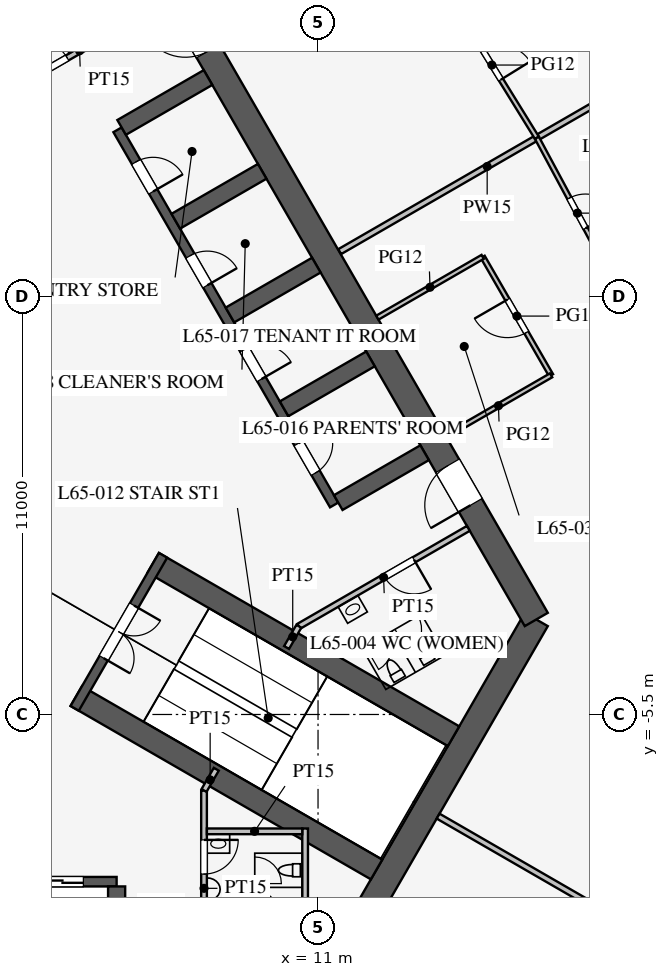
"""IFC4 building model, lengths in metres.
Left out: names, types, materials, properties, quantities, classifications, styles, units other than length and angle.
Written with IfcOpenShell. Run it as: python <this file> out.ifc"""

import sys

from ifc_helpers import new_model, si_unit, direction, frame, frame_2d, origin, place, context, subcontext, project, spatial, rectangle, extrude, element, fill, save


model = new_model("IFC4")
c1 = context("Model", 3, precision=1e-05, world=origin(), true_north=direction((0.0, 1.0)))
c2 = subcontext(c1, "Body", "Model", "MODEL_VIEW")
j1 = project(units=[si_unit("LENGTHUNIT", "METRE"), si_unit("PLANEANGLEUNIT", "RADIAN")], contexts=[c1])
p1 = place(None, origin())
s1 = spatial("IfcSite", under=j1, at=p1, CompositionType="ELEMENT")
p2 = place(p1, origin())
s2 = spatial("IfcBuilding", under=s1, at=p2, CompositionType="ELEMENT")
p3 = place(p2, frame((0.0, 0.0, 284.7)))
s3 = spatial("IfcBuildingStorey", under=s2, at=p3, CompositionType="ELEMENT", Elevation=284.7)
p4 = place(p3, frame((10.97, -13.0, 0.0), z_axis=(0.0, 0.0, 1.0), x_axis=(0.499995765644, 0.866027848477, 0.0)))
e1 = element("IfcWall", 1, at=p4, inside=s3, PredefinedType="SHEAR", context=c2, shape_type="SweptSolid", body=[
    extrude(rectangle(XDim=11.547, YDim=0.7, at=frame_2d((5.773, 0.0))), origin(), (0.0, 0.0, 1.0), 4.2),
])
p5 = place(p3, frame((16.743, -3.0, 0.0), z_axis=(0.0, 0.0, 1.0), x_axis=(-0.500002442456, 0.866023993627, 0.0)))
e2 = element("IfcWall", 2, at=p5, inside=s3, PredefinedType="SHEAR", context=c2, shape_type="SweptSolid", body=[
    extrude(rectangle(XDim=21.939, YDim=0.7, at=frame_2d((10.97, 0.0))), origin(), (0.0, 0.0, 1.0), 4.2),
])
p6 = place(p5, frame((17.27, 0.0, 0.0)))
e3 = element("IfcOpeningElement", 3, at=p6, cuts=e2, PredefinedType="OPENING", context=c2, shape_type="SweptSolid", body=[
    extrude(rectangle(XDim=1.2, YDim=2.1, at=frame_2d((0.6, 1.05))), frame((0.0, 0.36, 0.0), z_axis=(0.0, -1.0, 0.0), x_axis=(1.0, 0.0, 0.0)), (0.0, 0.0, 1.0), 0.72),
])
p7 = place(p5, frame((3.47, 0.0, 0.0)))
e4 = element("IfcOpeningElement", 4, at=p7, cuts=e2, PredefinedType="OPENING", context=c2, shape_type="SweptSolid", body=[
    extrude(rectangle(XDim=1.2, YDim=2.1, at=frame_2d((0.6, 1.05))), frame((0.0, 0.36, 0.0), z_axis=(0.0, -1.0, 0.0), x_axis=(1.0, 0.0, 0.0)), (0.0, 0.0, 1.0), 0.72),
])
p8 = place(p3, frame((-5.7, -9.9, 0.0), z_axis=(0.0, 0.0, 1.0), x_axis=(1.0, 0.0, 0.0)))
e5 = element("IfcWall", 5, at=p8, inside=s3, PredefinedType="SHEAR", context=c2, shape_type="SweptSolid", body=[
    extrude(rectangle(XDim=11.4, YDim=0.25, at=frame_2d((5.7, 0.0))), origin(), (0.0, 0.0, 1.0), 4.2),
])
p9 = place(p8, frame((0.875, 0.0, 0.0)))
e6 = element("IfcOpeningElement", 6, at=p9, cuts=e5, PredefinedType="OPENING", context=c2, shape_type="SweptSolid", body=[
    extrude(rectangle(XDim=1.1, YDim=2.2, at=frame_2d((0.55, 1.1))), frame((0.0, 0.135, 0.0), z_axis=(0.0, -1.0, 0.0), x_axis=(1.0, 0.0, 0.0)), (0.0, 0.0, 1.0), 0.27),
])
p10 = place(p8, frame((3.725, 0.0, 0.0)))
e7 = element("IfcOpeningElement", 7, at=p10, cuts=e5, PredefinedType="OPENING", context=c2, shape_type="SweptSolid", body=[
    extrude(rectangle(XDim=1.1, YDim=2.2, at=frame_2d((0.55, 1.1))), frame((0.0, 0.135, 0.0), z_axis=(0.0, -1.0, 0.0), x_axis=(1.0, 0.0, 0.0)), (0.0, 0.0, 1.0), 0.27),
])
p11 = place(p8, frame((6.575, 0.0, 0.0)))
e8 = element("IfcOpeningElement", 8, at=p11, cuts=e5, PredefinedType="OPENING", context=c2, shape_type="SweptSolid", body=[
    extrude(rectangle(XDim=1.1, YDim=2.2, at=frame_2d((0.55, 1.1))), frame((0.0, 0.135, 0.0), z_axis=(0.0, -1.0, 0.0), x_axis=(1.0, 0.0, 0.0)), (0.0, 0.0, 1.0), 0.27),
])
p12 = place(p8, frame((9.425, 0.0, 0.0)))
e9 = element("IfcOpeningElement", 9, at=p12, cuts=e5, PredefinedType="OPENING", context=c2, shape_type="SweptSolid", body=[
    extrude(rectangle(XDim=1.1, YDim=2.2, at=frame_2d((0.55, 1.1))), frame((0.0, 0.135, 0.0), z_axis=(0.0, -1.0, 0.0), x_axis=(1.0, 0.0, 0.0)), (0.0, 0.0, 1.0), 0.27),
])
p13 = place(p3, frame((5.7, -10.025, 0.0), z_axis=(0.0, 0.0, 1.0), x_axis=(0.0, -1.0, 0.0)))
e10 = element("IfcWall", 10, at=p13, inside=s3, PredefinedType="SHEAR", context=c2, shape_type="SweptSolid", body=[
    extrude(rectangle(XDim=2.625, YDim=0.45, at=frame_2d((1.312, 0.0))), origin(), (0.0, 0.0, 1.0), 4.2),
])
p14 = place(p3, frame((11.424, 0.014, 0.0), z_axis=(0.0, 0.0, 1.0), x_axis=(-0.500001763848, 0.866024385424, 0.0)))
e11 = element("IfcWall", 11, at=p14, inside=s3, PredefinedType="SHEAR", context=c2, shape_type="SweptSolid", body=[
    extrude(rectangle(XDim=11.4, YDim=0.25, at=frame_2d((5.7, 0.0))), origin(), (0.0, 0.0, 1.0), 4.2),
])
p15 = place(p14, frame((0.975, 0.0, 0.0)))
e12 = element("IfcOpeningElement", 12, at=p15, cuts=e11, PredefinedType="OPENING", context=c2, shape_type="SweptSolid", body=[
    extrude(rectangle(XDim=0.9, YDim=2.1, at=frame_2d((0.45, 1.05))), frame((0.0, 0.135, 0.0), z_axis=(0.0, -1.0, 0.0), x_axis=(1.0, 0.0, 0.0)), (0.0, 0.0, 1.0), 0.27),
])
p16 = place(p14, frame((3.825, 0.0, 0.0)))
e13 = element("IfcOpeningElement", 13, at=p16, cuts=e11, PredefinedType="OPENING", context=c2, shape_type="SweptSolid", body=[
    extrude(rectangle(XDim=0.9, YDim=2.1, at=frame_2d((0.45, 1.05))), frame((0.0, 0.135, 0.0), z_axis=(0.0, -1.0, 0.0), x_axis=(1.0, 0.0, 0.0)), (0.0, 0.0, 1.0), 0.27),
])
p17 = place(p14, frame((6.675, 0.0, 0.0)))
e14 = element("IfcOpeningElement", 14, at=p17, cuts=e11, PredefinedType="OPENING", context=c2, shape_type="SweptSolid", body=[
    extrude(rectangle(XDim=0.9, YDim=2.1, at=frame_2d((0.45, 1.05))), frame((0.0, 0.135, 0.0), z_axis=(0.0, -1.0, 0.0), x_axis=(1.0, 0.0, 0.0)), (0.0, 0.0, 1.0), 0.27),
])
p18 = place(p14, frame((9.525, 0.0, 0.0)))
e15 = element("IfcOpeningElement", 15, at=p18, cuts=e11, PredefinedType="OPENING", context=c2, shape_type="SweptSolid", body=[
    extrude(rectangle(XDim=0.9, YDim=2.1, at=frame_2d((0.45, 1.05))), frame((0.0, 0.135, 0.0), z_axis=(0.0, -1.0, 0.0), x_axis=(1.0, 0.0, 0.0)), (0.0, 0.0, 1.0), 0.27),
])
for number, where, z_axis, x_axis in (
    (16, (11.532, 0.076, 0.0), (0.0, 0.0, 1.0), (0.866, 0.5, 0.0)),
    (17, (10.107, 2.544, 0.0), (0.0, 0.0, 1.0), (0.866, 0.5, 0.0)),
    (18, (8.682, 5.012, 0.0), (0.0, 0.0, 1.0), (0.866, 0.5, 0.0)),
    (19, (7.257, 7.481, 0.0), (0.0, 0.0, 1.0), (0.866, 0.5, 0.0)),
    (20, (5.832, 9.949, 0.0), (0.0, 0.0, 1.0), (0.866, 0.5, 0.0)),
):
    element("IfcWall", number, at=place(p3, frame(where, z_axis=z_axis, x_axis=x_axis)), inside=s3, PredefinedType="SHEAR", context=c2, shape_type="SweptSolid", body=[
        extrude(rectangle(XDim=2.625, YDim=0.45, at=frame_2d((1.312, 0.0))), origin(), (0.0, 0.0, 1.0), 4.2),
    ])
for number, where, z_axis, x_axis in (
    (21, (4.638, -5.016, 0.0), (0.0, 0.0, 1.0), (0.866, -0.5, 0.0)),
    (22, (6.663, -1.509, 0.0), (0.0, 0.0, 1.0), (0.866, -0.5, 0.0)),
):
    element("IfcWall", number, at=place(p3, frame(where, z_axis=z_axis, x_axis=x_axis)), inside=s3, PredefinedType="SHEAR", context=c2, shape_type="SweptSolid", body=[
        extrude(rectangle(XDim=9.125, YDim=0.6, at=frame_2d((4.562, 0.0))), origin(), (0.0, 0.0, 1.0), 4.2),
    ])
p19 = place(p3, frame((4.597, -5.339, 0.0), z_axis=(0.0, 0.0, 1.0), x_axis=(0.499984536904, 0.866034331223, 0.0)))
e23 = element("IfcWall", 23, at=p19, inside=s3, PredefinedType="SHEAR", context=c2, shape_type="SweptSolid", body=[
    extrude(rectangle(XDim=4.65, YDim=0.25, at=frame_2d((2.325, 0.0))), origin(), (0.0, 0.0, 1.0), 4.2),
])
p20 = place(p19, frame((1.525, 0.0, 0.0)))
e24 = element("IfcOpeningElement", 24, at=p20, cuts=e23, PredefinedType="OPENING", context=c2, shape_type="SweptSolid", body=[
    extrude(rectangle(XDim=1.6, YDim=2.1, at=frame_2d((0.8, 1.05))), frame((0.0, 0.135, 0.0), z_axis=(0.0, -1.0, 0.0), x_axis=(1.0, 0.0, 0.0)), (0.0, 0.0, 1.0), 0.27),
])
p21 = place(p3, frame((8.0, -7.5, 0.0), z_axis=(0.0, 0.0, 1.0), x_axis=(0.0, -1.0, 0.0)))
e25 = element("IfcWall", 25, at=p21, inside=s3, PredefinedType="PARTITIONING", context=c2, shape_type="SweptSolid", body=[
    extrude(rectangle(XDim=5.15, YDim=0.15, at=frame_2d((2.575, 0.0))), origin(), (0.0, 0.0, 1.0), 4.0),
])
p22 = place(p21, frame((1.3, 0.0, 0.0)))
e26 = element("IfcOpeningElement", 26, at=p22, cuts=e25, PredefinedType="OPENING", context=c2, shape_type="SweptSolid", body=[
    extrude(rectangle(XDim=0.9, YDim=2.1, at=frame_2d((0.45, 1.05))), frame((0.0, 0.085, 0.0), z_axis=(0.0, -1.0, 0.0), x_axis=(1.0, 0.0, 0.0)), (0.0, 0.0, 1.0), 0.17),
])
p23 = place(p3, frame((2.495, 10.678, 0.0), z_axis=(0.0, 0.0, 1.0), x_axis=(0.866037967349, 0.499978238636, 0.0)))
e27 = element("IfcWall", 27, at=p23, inside=s3, PredefinedType="PARTITIONING", context=c2, shape_type="SweptSolid", body=[
    extrude(rectangle(XDim=5.15, YDim=0.15, at=frame_2d((2.575, 0.0))), origin(), (0.0, 0.0, 1.0), 4.0),
])
p24 = place(p23, frame((1.3, 0.0, 0.0)))
e28 = element("IfcOpeningElement", 28, at=p24, cuts=e27, PredefinedType="OPENING", context=c2, shape_type="SweptSolid", body=[
    extrude(rectangle(XDim=0.9, YDim=2.1, at=frame_2d((0.45, 1.05))), frame((0.0, 0.085, 0.0), z_axis=(0.0, -1.0, 0.0), x_axis=(1.0, 0.0, 0.0)), (0.0, 0.0, 1.0), 0.17),
])
p25 = place(p3, frame((10.495, -3.178, 0.0), z_axis=(0.0, 0.0, 1.0), x_axis=(0.866037967349, 0.499978238636, 0.0)))
e29 = element("IfcWall", 29, at=p25, inside=s3, PredefinedType="PARTITIONING", context=c2, shape_type="SweptSolid", body=[
    extrude(rectangle(XDim=5.15, YDim=0.15, at=frame_2d((2.575, 0.0))), origin(), (0.0, 0.0, 1.0), 4.0),
])
p26 = place(p25, frame((2.6, 0.0, 0.0)))
e30 = element("IfcOpeningElement", 30, at=p26, cuts=e29, PredefinedType="OPENING", context=c2, shape_type="SweptSolid", body=[
    extrude(rectangle(XDim=0.9, YDim=2.1, at=frame_2d((0.45, 1.05))), frame((0.0, 0.085, 0.0), z_axis=(0.0, -1.0, 0.0), x_axis=(1.0, 0.0, 0.0)), (0.0, 0.0, 1.0), 0.17),
])
for number, where, z_axis, x_axis in (
    (31, (8.0, -7.5, 0.0), (0.0, 0.0, 1.0), (0.5, 0.866, 0.0)),
    (32, (10.495, -3.178, 0.0), (0.0, 0.0, 1.0), (-0.5, -0.866, 0.0)),
):
    element("IfcWall", number, at=place(p3, frame(where, z_axis=z_axis, x_axis=x_axis)), inside=s3, PredefinedType="PARTITIONING", context=c2, shape_type="SweptSolid", body=[
        extrude(rectangle(XDim=0.645, YDim=0.15, at=frame_2d((0.323, 0.0))), origin(), (0.0, 0.0, 1.0), 4.0),
    ])
p27 = place(p3, frame((10.66, -8.5, 0.0), z_axis=(0.0, 0.0, 1.0), x_axis=(0.0, -1.0, 0.0)))
e33 = element("IfcWall", 33, at=p27, inside=s3, PredefinedType="PARTITIONING", context=c2, shape_type="SweptSolid", body=[
    extrude(rectangle(XDim=4.1, YDim=0.15, at=frame_2d((2.05, 0.0))), origin(), (0.0, 0.0, 1.0), 4.0),
])
p28 = place(p3, frame((8.075, -8.575, 0.0), z_axis=(0.0, 0.0, 1.0), x_axis=(1.0, 0.0, 0.0)))
e34 = element("IfcWall", 34, at=p28, inside=s3, PredefinedType="PARTITIONING", context=c2, shape_type="SweptSolid", body=[
    extrude(rectangle(XDim=2.51, YDim=0.15, at=frame_2d((1.255, 0.0))), origin(), (0.0, 0.0, 1.0), 4.0),
])
p29 = place(p3, frame((14.159, -8.175, 0.0), z_axis=(0.0, 0.0, 1.0), x_axis=(0.866026905467, -0.499997399001, 0.0)))
e35 = element("IfcWall", 35, at=p29, inside=s3, PredefinedType="PARTITIONING", context=c2, shape_type="SweptSolid", body=[
    extrude(rectangle(XDim=13.4, YDim=0.15, at=frame_2d((6.7, 0.0))), origin(), (0.0, 0.0, 1.0), 2.5),
])
p30 = place(p3, frame((11.57, 6.68, 0.0), z_axis=(0.0, 0.0, 1.0), x_axis=(0.866018180823, 0.500012510328, 0.0)))
e36 = element("IfcWall", 36, at=p30, inside=s3, PredefinedType="PARTITIONING", context=c2, shape_type="SweptSolid", body=[
    extrude(rectangle(XDim=8.962, YDim=0.15, at=frame_2d((4.481, 0.0))), origin(), (0.0, 0.0, 1.0), 3.0),
])
p31 = place(p3, frame((17.133, 3.425, 0.0), z_axis=(0.0, 0.0, 1.0), x_axis=(-0.500012057535, 0.866018442252, 0.0)))
e37 = element("IfcWall", 37, at=p31, inside=s3, PredefinedType="PARTITIONING", context=c2, shape_type="SweptSolid", body=[
    extrude(rectangle(XDim=3.6, YDim=0.12, at=frame_2d((1.8, 0.0))), origin(), (0.0, 0.0, 1.0), 2.9),
])
p32 = place(p31, frame((1.3, 0.0, 0.15)))
e38 = element("IfcOpeningElement", 38, at=p32, cuts=e37, PredefinedType="OPENING", context=c2, shape_type="SweptSolid", body=[
    extrude(rectangle(XDim=1.0, YDim=2.1, at=frame_2d((0.5, 1.05))), frame((0.0, 0.07, 0.0), z_axis=(0.0, -1.0, 0.0), x_axis=(1.0, 0.0, 0.0)), (0.0, 0.0, 1.0), 0.14),
])
p33 = place(p3, frame((12.562, 4.943, 0.0), z_axis=(0.0, 0.0, 1.0), x_axis=(0.866008981251, 0.500028443584, 0.0)))
e39 = element("IfcWall", 39, at=p33, inside=s3, PredefinedType="PARTITIONING", context=c2, shape_type="SweptSolid", body=[
    extrude(rectangle(XDim=3.2, YDim=0.12, at=frame_2d((1.6, 0.0))), origin(), (0.0, 0.0, 1.0), 2.9),
])
p34 = place(p3, frame((14.361, 1.825, 0.0), z_axis=(0.0, 0.0, 1.0), x_axis=(0.866028054938, 0.499995408039, 0.0)))
e40 = element("IfcWall", 40, at=p34, inside=s3, PredefinedType="PARTITIONING", context=c2, shape_type="SweptSolid", body=[
    extrude(rectangle(XDim=3.2, YDim=0.12, at=frame_2d((1.6, 0.0))), origin(), (0.0, 0.0, 1.0), 2.9),
])
p35 = place(p3, frame((16.759, 9.676, 0.0), z_axis=(0.0, 0.0, 1.0), x_axis=(-0.525996140194, 0.850486954927, 0.0)))
e41 = element("IfcWall", 41, at=p35, inside=s3, PredefinedType="PARTITIONING", context=c2, shape_type="SweptSolid", body=[
    extrude(rectangle(XDim=4.502, YDim=0.12, at=frame_2d((2.251, 0.0))), origin(), (0.0, 0.0, 1.0), 2.9),
])
p36 = place(p35, frame((1.8, 0.0, 0.15)))
e42 = element("IfcOpeningElement", 42, at=p36, cuts=e41, PredefinedType="OPENING", context=c2, shape_type="SweptSolid", body=[
    extrude(rectangle(XDim=0.9, YDim=2.1, at=frame_2d((0.45, 1.05))), frame((0.0, 0.07, 0.0), z_axis=(0.0, -1.0, 0.0), x_axis=(1.0, 0.0, 0.0)), (0.0, 0.0, 1.0), 0.14),
])
p37 = place(p3, frame((18.891, 5.71, 0.0), z_axis=(0.0, 0.0, 1.0), x_axis=(-0.473524102582, 0.880780860529, 0.0)))
e43 = element("IfcWall", 43, at=p37, inside=s3, PredefinedType="PARTITIONING", context=c2, shape_type="SweptSolid", body=[
    extrude(rectangle(XDim=4.502, YDim=0.12, at=frame_2d((2.251, 0.0))), origin(), (0.0, 0.0, 1.0), 2.9),
])
p38 = place(p37, frame((1.8, 0.0, 0.15)))
e44 = element("IfcOpeningElement", 44, at=p38, cuts=e43, PredefinedType="OPENING", context=c2, shape_type="SweptSolid", body=[
    extrude(rectangle(XDim=0.9, YDim=2.1, at=frame_2d((0.45, 1.05))), frame((0.0, 0.07, 0.0), z_axis=(0.0, -1.0, 0.0), x_axis=(1.0, 0.0, 0.0)), (0.0, 0.0, 1.0), 0.14),
])
p39 = place(p22, origin())
e45 = element("IfcDoor", 45, at=p39, inside=s3, OperationType="SINGLE_SWING_LEFT", PredefinedType="DOOR", context=c2, shape_type="SweptSolid", body=[
    extrude(rectangle(XDim=0.9, YDim=2.1, at=frame_2d((0.45, 1.05))), frame((0.0, 0.025, 0.0), z_axis=(0.0, -1.0, 0.0), x_axis=(1.0, 0.0, 0.0)), (0.0, 0.0, 1.0), 0.05),
])
fill(e26, e45)
p40 = place(p24, origin())
e46 = element("IfcDoor", 46, at=p40, inside=s3, OperationType="SINGLE_SWING_LEFT", PredefinedType="DOOR", context=c2, shape_type="SweptSolid", body=[
    extrude(rectangle(XDim=0.9, YDim=2.1, at=frame_2d((0.45, 1.05))), frame((0.0, 0.025, 0.0), z_axis=(0.0, -1.0, 0.0), x_axis=(1.0, 0.0, 0.0)), (0.0, 0.0, 1.0), 0.05),
])
fill(e28, e46)
p41 = place(p26, frame((0.9, 0.0, 0.0), z_axis=(0.0, 0.0, 1.0), x_axis=(-1.0, 0.0, 0.0)))
e47 = element("IfcDoor", 47, at=p41, inside=s3, OperationType="SINGLE_SWING_LEFT", PredefinedType="DOOR", context=c2, shape_type="SweptSolid", body=[
    extrude(rectangle(XDim=0.9, YDim=2.1, at=frame_2d((0.45, 1.05))), frame((0.0, 0.025, 0.0), z_axis=(0.0, -1.0, 0.0), x_axis=(1.0, 0.0, 0.0)), (0.0, 0.0, 1.0), 0.05),
])
fill(e30, e47)
p42 = place(p20, frame((1.6, 0.0, 0.0), z_axis=(0.0, 0.0, 1.0), x_axis=(-1.0, 0.0, 0.0)))
e48 = element("IfcDoor", 48, at=p42, inside=s3, OperationType="DOUBLE_DOOR_SINGLE_SWING", PredefinedType="DOOR", context=c2, shape_type="SweptSolid", body=[
    extrude(rectangle(XDim=1.6, YDim=2.1, at=frame_2d((0.8, 1.05))), frame((0.0, 0.025, 0.0), z_axis=(0.0, -1.0, 0.0), x_axis=(1.0, 0.0, 0.0)), (0.0, 0.0, 1.0), 0.05),
])
fill(e24, e48)
p43 = place(p6, origin())
e49 = element("IfcDoor", 49, at=p43, inside=s3, OperationType="SINGLE_SWING_RIGHT", PredefinedType="DOOR", context=c2, shape_type="SweptSolid", body=[
    extrude(rectangle(XDim=1.2, YDim=2.1, at=frame_2d((0.6, 1.05))), frame((0.0, 0.025, 0.0), z_axis=(0.0, -1.0, 0.0), x_axis=(1.0, 0.0, 0.0)), (0.0, 0.0, 1.0), 0.05),
])
fill(e3, e49)
p44 = place(p7, origin())
e50 = element("IfcDoor", 50, at=p44, inside=s3, OperationType="SINGLE_SWING_LEFT", PredefinedType="DOOR", context=c2, shape_type="SweptSolid", body=[
    extrude(rectangle(XDim=1.2, YDim=2.1, at=frame_2d((0.6, 1.05))), frame((0.0, 0.025, 0.0), z_axis=(0.0, -1.0, 0.0), x_axis=(1.0, 0.0, 0.0)), (0.0, 0.0, 1.0), 0.05),
])
fill(e4, e50)
p45 = place(p15, frame((0.9, 0.0, 0.0), z_axis=(0.0, 0.0, 1.0), x_axis=(-1.0, 0.0, 0.0)))
e51 = element("IfcDoor", 51, at=p45, inside=s3, OperationType="SINGLE_SWING_LEFT", PredefinedType="DOOR", context=c2, shape_type="SweptSolid", body=[
    extrude(rectangle(XDim=0.9, YDim=2.1, at=frame_2d((0.45, 1.05))), frame((0.0, 0.025, 0.0), z_axis=(0.0, -1.0, 0.0), x_axis=(1.0, 0.0, 0.0)), (0.0, 0.0, 1.0), 0.05),
])
fill(e12, e51)
p46 = place(p16, frame((0.9, 0.0, 0.0), z_axis=(0.0, 0.0, 1.0), x_axis=(-1.0, 0.0, 0.0)))
e52 = element("IfcDoor", 52, at=p46, inside=s3, OperationType="SINGLE_SWING_RIGHT", PredefinedType="DOOR", context=c2, shape_type="SweptSolid", body=[
    extrude(rectangle(XDim=0.9, YDim=2.1, at=frame_2d((0.45, 1.05))), frame((0.0, 0.025, 0.0), z_axis=(0.0, -1.0, 0.0), x_axis=(1.0, 0.0, 0.0)), (0.0, 0.0, 1.0), 0.05),
])
fill(e13, e52)
p47 = place(p17, frame((0.9, 0.0, 0.0), z_axis=(0.0, 0.0, 1.0), x_axis=(-1.0, 0.0, 0.0)))
e53 = element("IfcDoor", 53, at=p47, inside=s3, OperationType="SINGLE_SWING_RIGHT", PredefinedType="DOOR", context=c2, shape_type="SweptSolid", body=[
    extrude(rectangle(XDim=0.9, YDim=2.1, at=frame_2d((0.45, 1.05))), frame((0.0, 0.025, 0.0), z_axis=(0.0, -1.0, 0.0), x_axis=(1.0, 0.0, 0.0)), (0.0, 0.0, 1.0), 0.05),
])
fill(e14, e53)
p48 = place(p18, frame((0.9, 0.0, 0.0), z_axis=(0.0, 0.0, 1.0), x_axis=(-1.0, 0.0, 0.0)))
e54 = element("IfcDoor", 54, at=p48, inside=s3, OperationType="SINGLE_SWING_RIGHT", PredefinedType="DOOR", context=c2, shape_type="SweptSolid", body=[
    extrude(rectangle(XDim=0.9, YDim=2.1, at=frame_2d((0.45, 1.05))), frame((0.0, 0.025, 0.0), z_axis=(0.0, -1.0, 0.0), x_axis=(1.0, 0.0, 0.0)), (0.0, 0.0, 1.0), 0.05),
])
fill(e15, e54)
p49 = place(p32, origin())
e55 = element("IfcDoor", 55, at=p49, inside=s3, OperationType="SINGLE_SWING_RIGHT", PredefinedType="DOOR", context=c2, shape_type="SweptSolid", body=[
    extrude(rectangle(XDim=1.0, YDim=2.1, at=frame_2d((0.5, 1.05))), frame((0.0, 0.025, 0.0), z_axis=(0.0, -1.0, 0.0), x_axis=(1.0, 0.0, 0.0)), (0.0, 0.0, 1.0), 0.05),
])
fill(e38, e55)
p50 = place(p36, frame((0.9, 0.0, 0.0), z_axis=(0.0, 0.0, 1.0), x_axis=(-1.0, 0.0, 0.0)))
e56 = element("IfcDoor", 56, at=p50, inside=s3, OperationType="SINGLE_SWING_RIGHT", PredefinedType="DOOR", context=c2, shape_type="SweptSolid", body=[
    extrude(rectangle(XDim=0.9, YDim=2.1, at=frame_2d((0.45, 1.05))), frame((0.0, 0.025, 0.0), z_axis=(0.0, -1.0, 0.0), x_axis=(1.0, 0.0, 0.0)), (0.0, 0.0, 1.0), 0.05),
])
fill(e42, e56)
p51 = place(p38, frame((0.9, 0.0, 0.0), z_axis=(0.0, 0.0, 1.0), x_axis=(-1.0, 0.0, 0.0)))
e57 = element("IfcDoor", 57, at=p51, inside=s3, OperationType="SINGLE_SWING_RIGHT", PredefinedType="DOOR", context=c2, shape_type="SweptSolid", body=[
    extrude(rectangle(XDim=0.9, YDim=2.1, at=frame_2d((0.45, 1.05))), frame((0.0, 0.025, 0.0), z_axis=(0.0, -1.0, 0.0), x_axis=(1.0, 0.0, 0.0)), (0.0, 0.0, 1.0), 0.05),
])
fill(e44, e57)
p52 = place(p12, origin())
e58 = element("IfcDoor", 58, at=p52, inside=s3, OperationType="DOUBLE_DOOR_SLIDING", PredefinedType="DOOR", context=c2, shape_type="SweptSolid", body=[
    extrude(rectangle(XDim=1.1, YDim=2.2, at=frame_2d((0.55, 1.1))), frame((0.0, 0.025, 0.0), z_axis=(0.0, -1.0, 0.0), x_axis=(1.0, 0.0, 0.0)), (0.0, 0.0, 1.0), 0.05),
])
fill(e9, e58)
save(model, sys.argv[1])
